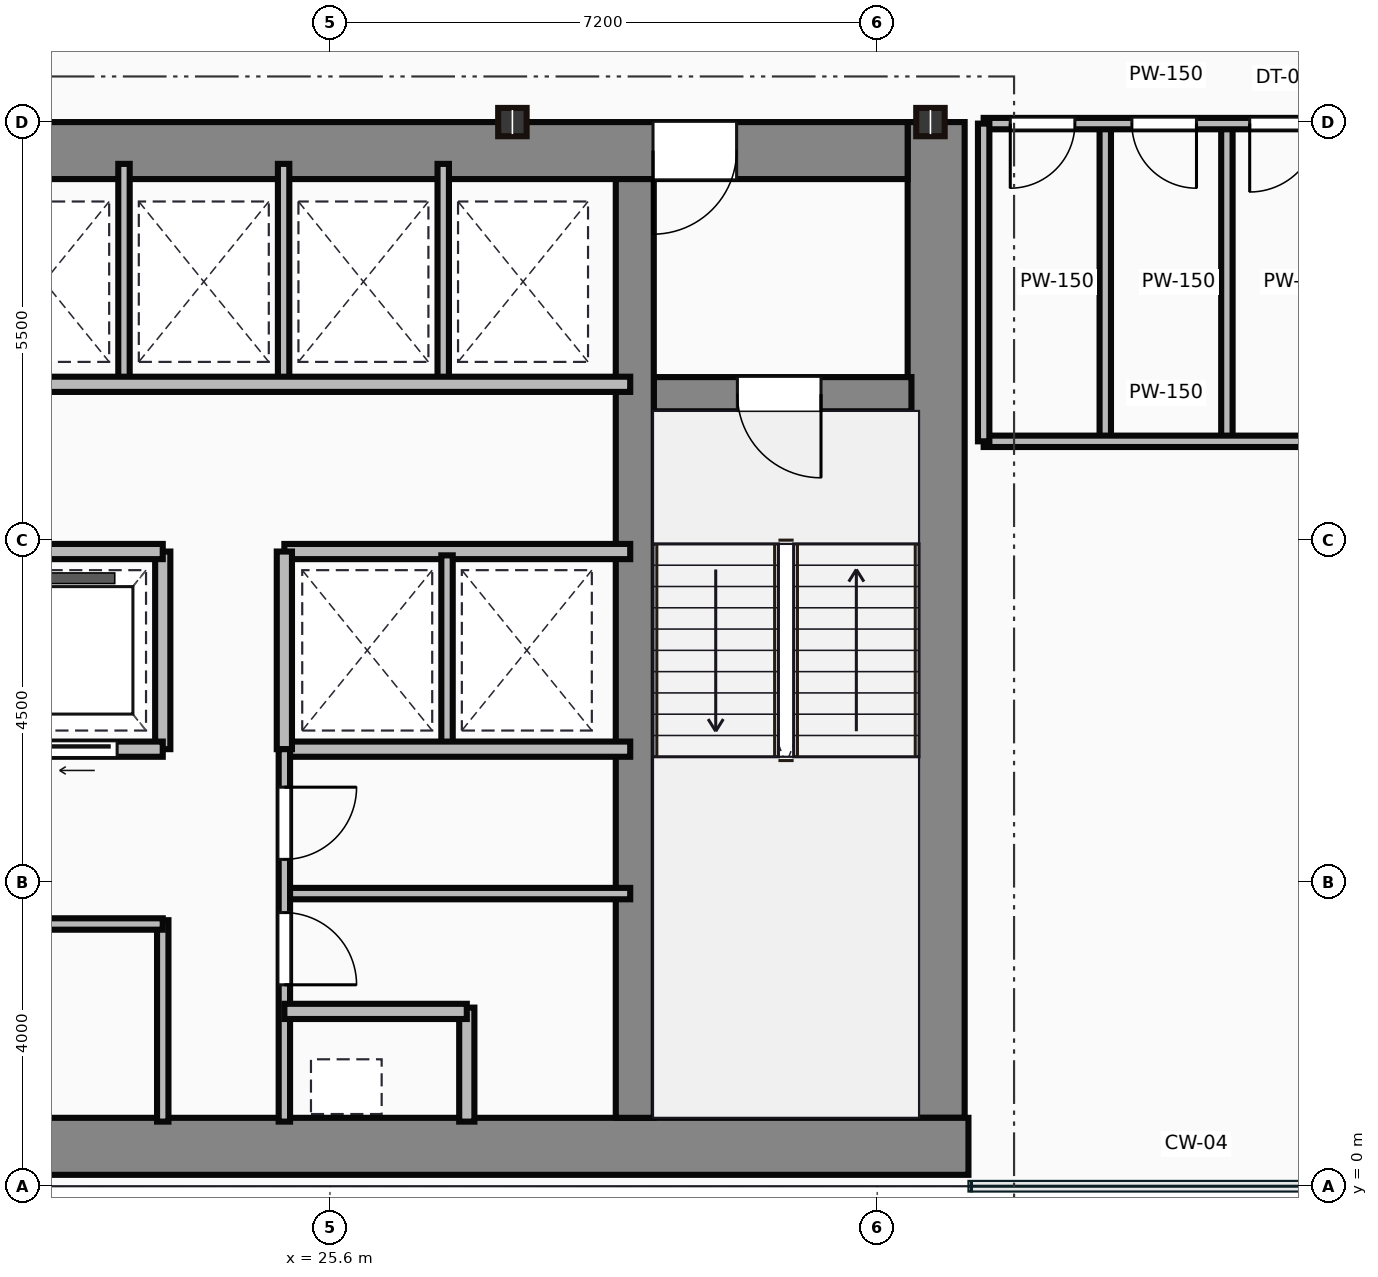
"""IFC4 building model, lengths in metres.
Left out: names, types, materials, properties, quantities, classifications, styles, units other than length and angle.
Written with IfcOpenShell. Run it as: python <this file> out.ifc"""

import sys

from ifc_helpers import new_model, si_unit, direction, frame, frame_2d, origin, origin_2d, place, context, subcontext, project, spatial, rectangle, i_section, extrude, source, transform, mapped, element, fill, save


model = new_model("IFC4")
c1 = context("Model", 3, precision=1e-05, world=origin(), true_north=direction((0.0, 1.0)))
c2 = subcontext(c1, "Body", "Model", "MODEL_VIEW")
j1 = project(units=[si_unit("LENGTHUNIT", "METRE"), si_unit("PLANEANGLEUNIT", "RADIAN")], contexts=[c1])
p1 = place(None, origin())
s1 = spatial("IfcSite", under=j1, at=p1, CompositionType="ELEMENT")
p2 = place(p1, origin())
s2 = spatial("IfcBuilding", under=s1, at=p2, CompositionType="ELEMENT")
p3 = place(p2, frame((0.0, 0.0, 173.45)))
s3 = spatial("IfcBuildingStorey", under=s2, at=p3, CompositionType="ELEMENT", Elevation=173.45)
m1 = source(origin(), c2, "Body", "SweptSolid", [
    extrude(rectangle(XDim=29.5, YDim=0.75, at=frame_2d((14.75, 0.0))), origin(), (0.0, 0.0, 1.0), 3.65),
])
p4 = place(p3, frame((4.5, 0.525, 0.0), z_axis=(0.0, 0.0, 1.0), x_axis=(1.0, 0.0, 0.0)))
e1 = element("IfcWall", 1, at=p4, inside=s3, PredefinedType="SHEAR", context=c2, shape_type="MappedRepresentation", body=[
    mapped(m1, transform((0.0, 0.0, 0.0))),
])
m2 = source(origin(), c2, "Body", "SweptSolid", [
    extrude(rectangle(XDim=13.1, YDim=0.75, at=frame_2d((6.55, 0.0))), origin(), (0.0, 0.0, 1.0), 3.65),
])
p5 = place(p3, frame((33.575, 0.9, 0.0), z_axis=(0.0, 0.0, 1.0), x_axis=(0.0, 1.0, 0.0)))
e2 = element("IfcWall", 2, at=p5, inside=s3, PredefinedType="SHEAR", context=c2, shape_type="MappedRepresentation", body=[
    mapped(m2, transform((0.0, 0.0, 0.0))),
])
m3 = source(origin(), c2, "Body", "SweptSolid", [
    extrude(rectangle(XDim=12.6, YDim=0.75, at=frame_2d((6.3, 0.0))), origin(), (0.0, 0.0, 1.0), 3.65),
])
p6 = place(p3, frame((20.6, 13.625, 0.0), z_axis=(0.0, 0.0, 1.0), x_axis=(1.0, 0.0, 0.0)))
e3 = element("IfcWall", 3, at=p6, inside=s3, PredefinedType="SHEAR", context=c2, shape_type="MappedRepresentation", body=[
    mapped(m3, transform((0.0, 0.0, 0.0))),
])
p7 = place(p6, frame((9.25, 0.0, 0.0)))
e4 = element("IfcOpeningElement", 4, at=p7, cuts=e3, PredefinedType="OPENING", context=c2, shape_type="SweptSolid", body=[
    extrude(rectangle(XDim=1.1, YDim=2.15, at=frame_2d((0.55, 1.075))), frame((0.0, 0.385, 0.0), z_axis=(0.0, -1.0, 0.0), x_axis=(1.0, 0.0, 0.0)), (0.0, 0.0, 1.0), 0.77),
])
m4 = source(origin(), c2, "Body", "SweptSolid", [
    extrude(rectangle(XDim=12.35, YDim=0.5, at=frame_2d((6.175, 0.0))), origin(), (0.0, 0.0, 1.0), 3.65),
])
p8 = place(p3, frame((29.61, 0.9, 0.0), z_axis=(0.0, 0.0, 1.0), x_axis=(0.0, 1.0, 0.0)))
e5 = element("IfcWall", 5, at=p8, inside=s3, PredefinedType="SHEAR", context=c2, shape_type="MappedRepresentation", body=[
    mapped(m4, transform((0.0, 0.0, 0.0))),
])
m5 = source(origin(), c2, "Body", "SweptSolid", [
    extrude(rectangle(XDim=3.39, YDim=0.45, at=frame_2d((1.695, 0.0))), origin(), (0.0, 0.0, 1.0), 3.65),
])
p9 = place(p3, frame((29.86, 10.42, 0.0), z_axis=(0.0, 0.0, 1.0), x_axis=(1.0, 0.0, 0.0)))
e6 = element("IfcWall", 6, at=p9, inside=s3, PredefinedType="SHEAR", context=c2, shape_type="MappedRepresentation", body=[
    mapped(m5, transform((0.0, 0.0, 0.0))),
])
p10 = place(p9, frame((1.1, 0.0, 0.0)))
e7 = element("IfcOpeningElement", 7, at=p10, cuts=e6, PredefinedType="OPENING", context=c2, shape_type="SweptSolid", body=[
    extrude(rectangle(XDim=1.1, YDim=2.15, at=frame_2d((0.55, 1.075))), frame((0.0, 0.235, 0.0), z_axis=(0.0, -1.0, 0.0), x_axis=(1.0, 0.0, 0.0)), (0.0, 0.0, 1.0), 0.47),
])
m6 = source(origin(), c2, "Body", "SweptSolid", [
    extrude(i_section(OverallWidth=0.374, OverallDepth=0.372, WebThickness=0.016, FlangeThickness=0.026, at=origin_2d()), origin(), (0.0, 0.0, 1.0), 3.65),
])
for number, where, z_axis, x_axis in (
    (8, (28.0, 14.0, 0.0), (0.0, 0.0, 1.0), (1.0, 0.0, 0.0)),
    (9, (33.5, 14.0, 0.0), (0.0, 0.0, 1.0), (1.0, 0.0, 0.0)),
):
    element("IfcColumn", number, at=place(p3, frame(where, z_axis=z_axis, x_axis=x_axis)), inside=s3, PredefinedType="COLUMN", context=c2, shape_type="MappedRepresentation", body=[
        mapped(m6, transform((0.0, 0.0, 0.0))),
    ])
m7 = source(origin(), c2, "Body", "SweptSolid", [
    extrude(rectangle(XDim=10.35, YDim=0.15, at=frame_2d((5.175, 0.0))), origin(), (0.0, 0.0, 1.0), 3.4),
])
p11 = place(p3, frame((13.05, 3.45, 0.0), z_axis=(0.0, 0.0, 1.0), x_axis=(1.0, 0.0, 0.0)))
e10 = element("IfcWall", 10, at=p11, inside=s3, PredefinedType="PARTITIONING", context=c2, shape_type="MappedRepresentation", body=[
    mapped(m7, transform((0.0, 0.0, 0.0))),
])
p12 = place(p11, frame((2.1, 0.0, 0.0)))
e11 = element("IfcOpeningElement", 11, at=p12, cuts=e10, PredefinedType="OPENING", context=c2, shape_type="SweptSolid", body=[
    extrude(rectangle(XDim=0.95, YDim=2.15, at=frame_2d((0.475, 1.075))), frame((0.0, 0.085, 0.0), z_axis=(0.0, -1.0, 0.0), x_axis=(1.0, 0.0, 0.0)), (0.0, 0.0, 1.0), 0.17),
])
p13 = place(p11, frame((6.8, 0.0, 0.0)))
e12 = element("IfcOpeningElement", 12, at=p13, cuts=e10, PredefinedType="OPENING", context=c2, shape_type="SweptSolid", body=[
    extrude(rectangle(XDim=0.95, YDim=2.15, at=frame_2d((0.475, 1.075))), frame((0.0, 0.085, 0.0), z_axis=(0.0, -1.0, 0.0), x_axis=(1.0, 0.0, 0.0)), (0.0, 0.0, 1.0), 0.17),
])
m8 = source(origin(), c2, "Body", "SweptSolid", [
    extrude(rectangle(XDim=2.65, YDim=0.15, at=frame_2d((1.325, 0.0))), origin(), (0.0, 0.0, 1.0), 3.4),
])
p14 = place(p3, frame((23.4, 0.85, 0.0), z_axis=(0.0, 0.0, 1.0), x_axis=(0.0, 1.0, 0.0)))
e13 = element("IfcWall", 13, at=p14, inside=s3, PredefinedType="PARTITIONING", context=c2, shape_type="MappedRepresentation", body=[
    mapped(m8, transform((0.0, 0.0, 0.0))),
])
m9 = source(origin(), c2, "Body", "SweptSolid", [
    extrude(rectangle(XDim=11.85, YDim=0.2, at=frame_2d((5.925, 0.0))), origin(), (0.0, 0.0, 1.0), 3.4),
])
p15 = place(p3, frame((11.55, 5.75, 0.0), z_axis=(0.0, 0.0, 1.0), x_axis=(1.0, 0.0, 0.0)))
e14 = element("IfcWall", 14, at=p15, inside=s3, PredefinedType="PARTITIONING", context=c2, shape_type="MappedRepresentation", body=[
    mapped(m9, transform((0.0, 0.0, 0.0))),
])
p16 = place(p15, frame((0.45, 0.0, 0.0)))
e15 = element("IfcOpeningElement", 15, at=p16, cuts=e14, PredefinedType="OPENING", context=c2, shape_type="SweptSolid", body=[
    extrude(rectangle(XDim=1.05, YDim=2.15, at=frame_2d((0.525, 1.075))), frame((0.0, 0.11, 0.0), z_axis=(0.0, -1.0, 0.0), x_axis=(1.0, 0.0, 0.0)), (0.0, 0.0, 1.0), 0.22),
])
p17 = place(p15, frame((2.4, 0.0, 0.0)))
e16 = element("IfcOpeningElement", 16, at=p17, cuts=e14, PredefinedType="OPENING", context=c2, shape_type="SweptSolid", body=[
    extrude(rectangle(XDim=1.05, YDim=2.15, at=frame_2d((0.525, 1.075))), frame((0.0, 0.11, 0.0), z_axis=(0.0, -1.0, 0.0), x_axis=(1.0, 0.0, 0.0)), (0.0, 0.0, 1.0), 0.22),
])
p18 = place(p15, frame((4.35, 0.0, 0.0)))
e17 = element("IfcOpeningElement", 17, at=p18, cuts=e14, PredefinedType="OPENING", context=c2, shape_type="SweptSolid", body=[
    extrude(rectangle(XDim=1.05, YDim=2.15, at=frame_2d((0.525, 1.075))), frame((0.0, 0.11, 0.0), z_axis=(0.0, -1.0, 0.0), x_axis=(1.0, 0.0, 0.0)), (0.0, 0.0, 1.0), 0.22),
])
p19 = place(p15, frame((6.3, 0.0, 0.0)))
e18 = element("IfcOpeningElement", 18, at=p19, cuts=e14, PredefinedType="OPENING", context=c2, shape_type="SweptSolid", body=[
    extrude(rectangle(XDim=1.05, YDim=2.15, at=frame_2d((0.525, 1.075))), frame((0.0, 0.11, 0.0), z_axis=(0.0, -1.0, 0.0), x_axis=(1.0, 0.0, 0.0)), (0.0, 0.0, 1.0), 0.22),
])
p20 = place(p15, frame((8.25, 0.0, 0.0)))
e19 = element("IfcOpeningElement", 19, at=p20, cuts=e14, PredefinedType="OPENING", context=c2, shape_type="SweptSolid", body=[
    extrude(rectangle(XDim=1.05, YDim=2.15, at=frame_2d((0.525, 1.075))), frame((0.0, 0.11, 0.0), z_axis=(0.0, -1.0, 0.0), x_axis=(1.0, 0.0, 0.0)), (0.0, 0.0, 1.0), 0.22),
])
p21 = place(p15, frame((10.2, 0.0, 0.0)))
e20 = element("IfcOpeningElement", 20, at=p21, cuts=e14, PredefinedType="OPENING", context=c2, shape_type="SweptSolid", body=[
    extrude(rectangle(XDim=1.05, YDim=2.15, at=frame_2d((0.525, 1.075))), frame((0.0, 0.11, 0.0), z_axis=(0.0, -1.0, 0.0), x_axis=(1.0, 0.0, 0.0)), (0.0, 0.0, 1.0), 0.22),
])
p22 = place(p3, frame((11.55, 8.35, 0.0), z_axis=(0.0, 0.0, 1.0), x_axis=(1.0, 0.0, 0.0)))
e21 = element("IfcWall", 21, at=p22, inside=s3, PredefinedType="PARTITIONING", context=c2, shape_type="MappedRepresentation", body=[
    mapped(m9, transform((0.0, 0.0, 0.0))),
])
m10 = source(origin(), c2, "Body", "SweptSolid", [
    extrude(rectangle(XDim=2.6, YDim=0.2, at=frame_2d((1.3, 0.0))), origin(), (0.0, 0.0, 1.0), 3.4),
])
p23 = place(p3, frame((23.4, 5.75, 0.0), z_axis=(0.0, 0.0, 1.0), x_axis=(0.0, 1.0, 0.0)))
e22 = element("IfcWall", 22, at=p23, inside=s3, PredefinedType="PARTITIONING", context=c2, shape_type="MappedRepresentation", body=[
    mapped(m10, transform((0.0, 0.0, 0.0))),
])
m11 = source(origin(), c2, "Body", "SweptSolid", [
    extrude(rectangle(XDim=8.8, YDim=0.2, at=frame_2d((4.4, 0.0))), origin(), (0.0, 0.0, 1.0), 3.4),
])
p24 = place(p3, frame((20.75, 10.55, 0.0), z_axis=(0.0, 0.0, 1.0), x_axis=(1.0, 0.0, 0.0)))
e23 = element("IfcWall", 23, at=p24, inside=s3, PredefinedType="PARTITIONING", context=c2, shape_type="MappedRepresentation", body=[
    mapped(m11, transform((0.0, 0.0, 0.0))),
])
m12 = source(origin(), c2, "Body", "SweptSolid", [
    extrude(rectangle(XDim=2.85, YDim=0.15, at=frame_2d((1.425, 0.0))), origin(), (0.0, 0.0, 1.0), 3.4),
])
for number, where, z_axis, x_axis in (
    (24, (22.89, 10.6, 0.0), (0.0, 0.0, 1.0), (0.0, 1.0, 0.0)),
    (25, (24.99, 10.6, 0.0), (0.0, 0.0, 1.0), (0.0, 1.0, 0.0)),
    (26, (27.09, 10.6, 0.0), (0.0, 0.0, 1.0), (0.0, 1.0, 0.0)),
):
    element("IfcWall", number, at=place(p3, frame(where, z_axis=z_axis, x_axis=x_axis)), inside=s3, PredefinedType="PARTITIONING", context=c2, shape_type="MappedRepresentation", body=[
        mapped(m12, transform((0.0, 0.0, 0.0))),
    ])
m13 = source(origin(), c2, "Body", "SweptSolid", [
    extrude(rectangle(XDim=4.55, YDim=0.2, at=frame_2d((2.275, 0.0))), origin(), (0.0, 0.0, 1.0), 3.4),
])
for number, where, z_axis, x_axis in (
    (27, (25.0, 8.35, 0.0), (0.0, 0.0, 1.0), (1.0, 0.0, 0.0)),
    (28, (25.0, 5.75, 0.0), (0.0, 0.0, 1.0), (1.0, 0.0, 0.0)),
):
    element("IfcWall", number, at=place(p3, frame(where, z_axis=z_axis, x_axis=x_axis)), inside=s3, PredefinedType="PARTITIONING", context=c2, shape_type="MappedRepresentation", body=[
        mapped(m13, transform((0.0, 0.0, 0.0))),
    ])
p25 = place(p3, frame((25.0, 5.75, 0.0), z_axis=(0.0, 0.0, 1.0), x_axis=(0.0, 1.0, 0.0)))
e29 = element("IfcWall", 29, at=p25, inside=s3, PredefinedType="PARTITIONING", context=c2, shape_type="MappedRepresentation", body=[
    mapped(m10, transform((0.0, 0.0, 0.0))),
])
m14 = source(origin(), c2, "Body", "SweptSolid", [
    extrude(rectangle(XDim=2.5, YDim=0.15, at=frame_2d((1.25, 0.0))), origin(), (0.0, 0.0, 1.0), 3.4),
])
p26 = place(p3, frame((27.14, 5.8, 0.0), z_axis=(0.0, 0.0, 1.0), x_axis=(0.0, 1.0, 0.0)))
e30 = element("IfcWall", 30, at=p26, inside=s3, PredefinedType="PARTITIONING", context=c2, shape_type="MappedRepresentation", body=[
    mapped(m14, transform((0.0, 0.0, 0.0))),
])
m15 = source(origin(), c2, "Body", "SweptSolid", [
    extrude(rectangle(XDim=4.9, YDim=0.15, at=frame_2d((2.45, 0.0))), origin(), (0.0, 0.0, 1.0), 3.4),
])
p27 = place(p3, frame((25.0, 0.85, 0.0), z_axis=(0.0, 0.0, 1.0), x_axis=(0.0, 1.0, 0.0)))
e31 = element("IfcWall", 31, at=p27, inside=s3, PredefinedType="PARTITIONING", context=c2, shape_type="MappedRepresentation", body=[
    mapped(m15, transform((0.0, 0.0, 0.0))),
])
p28 = place(p27, frame((1.8, 0.0, 0.0)))
e32 = element("IfcOpeningElement", 32, at=p28, cuts=e31, PredefinedType="OPENING", context=c2, shape_type="SweptSolid", body=[
    extrude(rectangle(XDim=0.95, YDim=2.15, at=frame_2d((0.475, 1.075))), frame((0.0, 0.085, 0.0), z_axis=(0.0, -1.0, 0.0), x_axis=(1.0, 0.0, 0.0)), (0.0, 0.0, 1.0), 0.17),
])
p29 = place(p27, frame((3.45, 0.0, 0.0)))
e33 = element("IfcOpeningElement", 33, at=p29, cuts=e31, PredefinedType="OPENING", context=c2, shape_type="SweptSolid", body=[
    extrude(rectangle(XDim=0.95, YDim=2.15, at=frame_2d((0.475, 1.075))), frame((0.0, 0.085, 0.0), z_axis=(0.0, -1.0, 0.0), x_axis=(1.0, 0.0, 0.0)), (0.0, 0.0, 1.0), 0.17),
])
m16 = source(origin(), c2, "Body", "SweptSolid", [
    extrude(rectangle(XDim=2.4, YDim=0.2, at=frame_2d((1.2, 0.0))), origin(), (0.0, 0.0, 1.0), 3.4),
])
p30 = place(p3, frame((25.0, 2.3, 0.0), z_axis=(0.0, 0.0, 1.0), x_axis=(1.0, 0.0, 0.0)))
e34 = element("IfcWall", 34, at=p30, inside=s3, PredefinedType="PARTITIONING", context=c2, shape_type="MappedRepresentation", body=[
    mapped(m16, transform((0.0, 0.0, 0.0))),
])
m17 = source(origin(), c2, "Body", "SweptSolid", [
    extrude(rectangle(XDim=1.5, YDim=0.2, at=frame_2d((0.75, 0.0))), origin(), (0.0, 0.0, 1.0), 3.4),
])
p31 = place(p3, frame((27.4, 0.85, 0.0), z_axis=(0.0, 0.0, 1.0), x_axis=(0.0, 1.0, 0.0)))
e35 = element("IfcWall", 35, at=p31, inside=s3, PredefinedType="PARTITIONING", context=c2, shape_type="MappedRepresentation", body=[
    mapped(m17, transform((0.0, 0.0, 0.0))),
])
m18 = source(origin(), c2, "Body", "SweptSolid", [
    extrude(rectangle(XDim=4.55, YDim=0.15, at=frame_2d((2.275, 0.0))), origin(), (0.0, 0.0, 1.0), 3.4),
])
p32 = place(p3, frame((25.0, 3.85, 0.0), z_axis=(0.0, 0.0, 1.0), x_axis=(1.0, 0.0, 0.0)))
e36 = element("IfcWall", 36, at=p32, inside=s3, PredefinedType="PARTITIONING", context=c2, shape_type="MappedRepresentation", body=[
    mapped(m18, transform((0.0, 0.0, 0.0))),
])
m19 = source(origin(), c2, "Body", "SweptSolid", [
    extrude(rectangle(XDim=4.8, YDim=0.15, at=frame_2d((2.4, 0.0))), origin(), (0.0, 0.0, 1.0), 2.76),
])
p33 = place(p3, frame((34.2, 13.98, 0.0), z_axis=(0.0, 0.0, 1.0), x_axis=(1.0, 0.0, 0.0)))
e37 = element("IfcWall", 37, at=p33, inside=s3, PredefinedType="PARTITIONING", context=c2, shape_type="MappedRepresentation", body=[
    mapped(m19, transform((0.0, 0.0, 0.0))),
])
p34 = place(p33, frame((0.35, 0.0, 0.0)))
e38 = element("IfcOpeningElement", 38, at=p34, cuts=e37, PredefinedType="OPENING", context=c2, shape_type="SweptSolid", body=[
    extrude(rectangle(XDim=0.85, YDim=2.1, at=frame_2d((0.425, 1.05))), frame((0.0, 0.085, 0.0), z_axis=(0.0, -1.0, 0.0), x_axis=(1.0, 0.0, 0.0)), (0.0, 0.0, 1.0), 0.17),
])
p35 = place(p33, frame((1.95, 0.0, 0.0)))
e39 = element("IfcOpeningElement", 39, at=p35, cuts=e37, PredefinedType="OPENING", context=c2, shape_type="SweptSolid", body=[
    extrude(rectangle(XDim=0.85, YDim=2.1, at=frame_2d((0.425, 1.05))), frame((0.0, 0.085, 0.0), z_axis=(0.0, -1.0, 0.0), x_axis=(1.0, 0.0, 0.0)), (0.0, 0.0, 1.0), 0.17),
])
p36 = place(p33, frame((3.5, 0.0, 0.0)))
e40 = element("IfcOpeningElement", 40, at=p36, cuts=e37, PredefinedType="OPENING", context=c2, shape_type="SweptSolid", body=[
    extrude(rectangle(XDim=0.9, YDim=2.1, at=frame_2d((0.45, 1.05))), frame((0.0, 0.085, 0.0), z_axis=(0.0, -1.0, 0.0), x_axis=(1.0, 0.0, 0.0)), (0.0, 0.0, 1.0), 0.17),
])
m20 = source(origin(), c2, "Body", "SweptSolid", [
    extrude(rectangle(XDim=4.8, YDim=0.15, at=frame_2d((2.4, 0.0))), origin(), (0.0, 0.0, 1.0), 3.4),
])
p37 = place(p3, frame((34.2, 9.8, 0.0), z_axis=(0.0, 0.0, 1.0), x_axis=(1.0, 0.0, 0.0)))
e41 = element("IfcWall", 41, at=p37, inside=s3, PredefinedType="PARTITIONING", context=c2, shape_type="MappedRepresentation", body=[
    mapped(m20, transform((0.0, 0.0, 0.0))),
])
m21 = source(origin(), c2, "Body", "SweptSolid", [
    extrude(rectangle(XDim=4.18, YDim=0.15, at=frame_2d((2.09, 0.0))), origin(), (0.0, 0.0, 1.0), 3.4),
])
for number, where, z_axis, x_axis in (
    (42, (34.2, 9.8, 0.0), (0.0, 0.0, 1.0), (0.0, 1.0, 0.0)),
    (43, (35.8, 9.8, 0.0), (0.0, 0.0, 1.0), (0.0, 1.0, 0.0)),
    (44, (37.4, 9.8, 0.0), (0.0, 0.0, 1.0), (0.0, 1.0, 0.0)),
):
    element("IfcWall", number, at=place(p3, frame(where, z_axis=z_axis, x_axis=x_axis)), inside=s3, PredefinedType="PARTITIONING", context=c2, shape_type="MappedRepresentation", body=[
        mapped(m21, transform((0.0, 0.0, 0.0))),
    ])
m22 = source(origin(), c2, "Body", "SweptSolid", [
    extrude(rectangle(XDim=1.1, YDim=2.15, at=frame_2d((0.55, 1.075))), frame((0.0, 0.025, 0.0), z_axis=(0.0, -1.0, 0.0), x_axis=(1.0, 0.0, 0.0)), (0.0, 0.0, 1.0), 0.05),
])
p38 = place(p10, frame((1.1, 0.0, 0.0), z_axis=(0.0, 0.0, 1.0), x_axis=(-1.0, 0.0, 0.0)))
e45 = element("IfcDoor", 45, at=p38, inside=s3, OperationType="SINGLE_SWING_RIGHT", PredefinedType="DOOR", context=c2, shape_type="MappedRepresentation", body=[
    mapped(m22, transform((0.0, 0.0, 0.0))),
])
fill(e7, e45)
p39 = place(p7, origin())
e46 = element("IfcDoor", 46, at=p39, inside=s3, OperationType="SINGLE_SWING_LEFT", PredefinedType="DOOR", context=c2, shape_type="MappedRepresentation", body=[
    mapped(m22, transform((0.0, 0.0, 0.0))),
])
fill(e4, e46)
m23 = source(origin(), c2, "Body", "SweptSolid", [
    extrude(rectangle(XDim=1.05, YDim=2.15, at=frame_2d((0.525, 1.075))), frame((0.0, 0.025, 0.0), z_axis=(0.0, -1.0, 0.0), x_axis=(1.0, 0.0, 0.0)), (0.0, 0.0, 1.0), 0.05),
])
p40 = place(p21, frame((1.05, 0.0, 0.0), z_axis=(0.0, 0.0, 1.0), x_axis=(-1.0, 0.0, 0.0)))
e47 = element("IfcDoor", 47, at=p40, inside=s3, OperationType="SLIDING_TO_LEFT", PredefinedType="DOOR", context=c2, shape_type="MappedRepresentation", body=[
    mapped(m23, transform((0.0, 0.0, 0.0))),
])
fill(e20, e47)
m24 = source(origin(), c2, "Body", "SweptSolid", [
    extrude(rectangle(XDim=0.95, YDim=2.15, at=frame_2d((0.475, 1.075))), frame((0.0, 0.025, 0.0), z_axis=(0.0, -1.0, 0.0), x_axis=(1.0, 0.0, 0.0)), (0.0, 0.0, 1.0), 0.05),
])
p41 = place(p28, origin())
e48 = element("IfcDoor", 48, at=p41, inside=s3, OperationType="SINGLE_SWING_LEFT", PredefinedType="DOOR", context=c2, shape_type="MappedRepresentation", body=[
    mapped(m24, transform((0.0, 0.0, 0.0))),
])
fill(e32, e48)
p42 = place(p29, origin())
e49 = element("IfcDoor", 49, at=p42, inside=s3, OperationType="SINGLE_SWING_RIGHT", PredefinedType="DOOR", context=c2, shape_type="MappedRepresentation", body=[
    mapped(m24, transform((0.0, 0.0, 0.0))),
])
fill(e33, e49)
m25 = source(origin(), c2, "Body", "SweptSolid", [
    extrude(rectangle(XDim=0.85, YDim=2.1, at=frame_2d((0.425, 1.05))), frame((0.0, 0.025, 0.0), z_axis=(0.0, -1.0, 0.0), x_axis=(1.0, 0.0, 0.0)), (0.0, 0.0, 1.0), 0.05),
])
p43 = place(p34, frame((0.85, 0.0, 0.0), z_axis=(0.0, 0.0, 1.0), x_axis=(-1.0, 0.0, 0.0)))
e50 = element("IfcDoor", 50, at=p43, inside=s3, OperationType="SINGLE_SWING_LEFT", PredefinedType="DOOR", context=c2, shape_type="MappedRepresentation", body=[
    mapped(m25, transform((0.0, 0.0, 0.0))),
])
fill(e38, e50)
p44 = place(p35, frame((0.85, 0.0, 0.0), z_axis=(0.0, 0.0, 1.0), x_axis=(-1.0, 0.0, 0.0)))
e51 = element("IfcDoor", 51, at=p44, inside=s3, OperationType="SINGLE_SWING_RIGHT", PredefinedType="DOOR", context=c2, shape_type="MappedRepresentation", body=[
    mapped(m25, transform((0.0, 0.0, 0.0))),
])
fill(e39, e51)
m26 = source(origin(), c2, "Body", "SweptSolid", [
    extrude(rectangle(XDim=0.9, YDim=2.1, at=frame_2d((0.45, 1.05))), frame((0.0, 0.025, 0.0), z_axis=(0.0, -1.0, 0.0), x_axis=(1.0, 0.0, 0.0)), (0.0, 0.0, 1.0), 0.05),
])
p45 = place(p36, frame((0.9, 0.0, 0.0), z_axis=(0.0, 0.0, 1.0), x_axis=(-1.0, 0.0, 0.0)))
e52 = element("IfcDoor", 52, at=p45, inside=s3, OperationType="SINGLE_SWING_LEFT", PredefinedType="DOOR", context=c2, shape_type="MappedRepresentation", body=[
    mapped(m26, transform((0.0, 0.0, 0.0))),
])
fill(e40, e52)
save(model, sys.argv[1])
